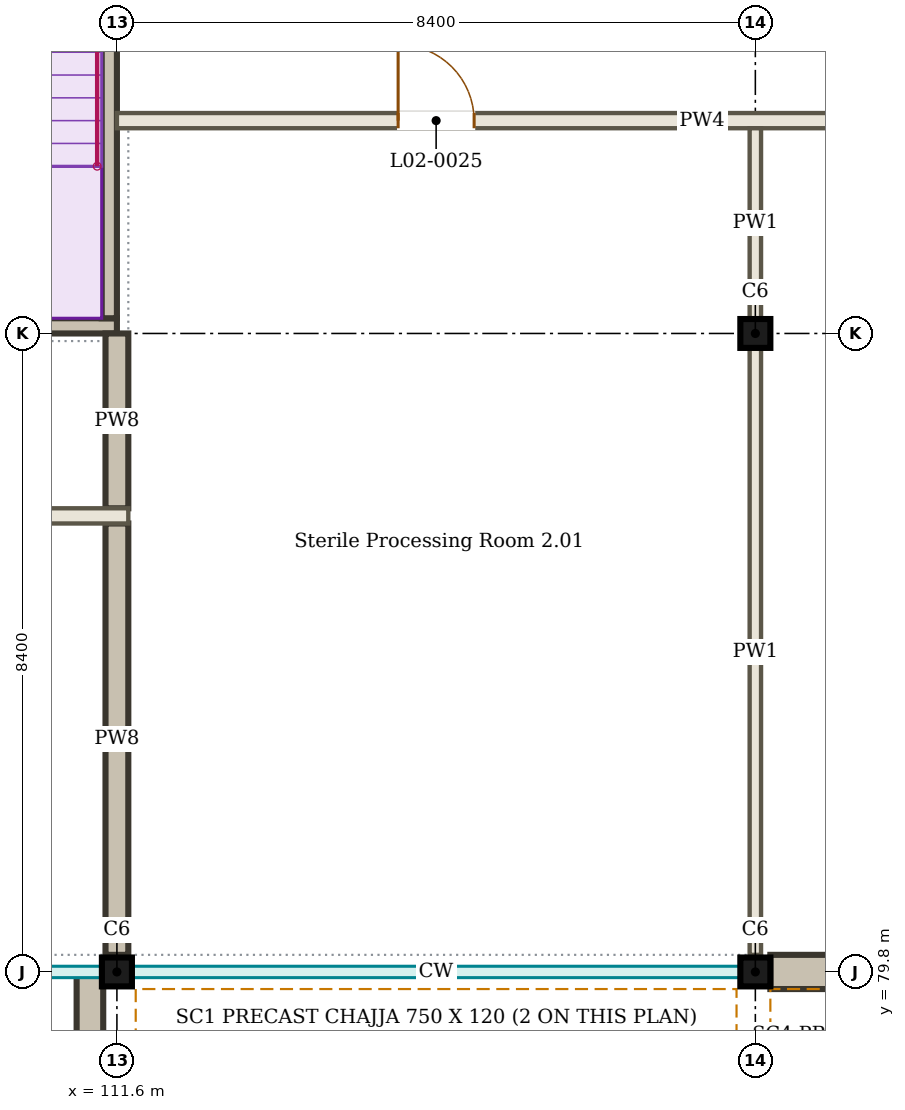
"""IFC4 building model, lengths in metres.
Left out: names, types, materials, properties, quantities, classifications, styles, units other than length and angle.
Written with IfcOpenShell. Run it as: python <this file> out.ifc"""

import sys

from ifc_helpers import new_model, si_unit, direction, frame, frame_2d, origin, origin_2d, place, context, subcontext, project, spatial, polyline, rectangle, i_section, outline, extrude, element, fill, save


model = new_model("IFC4")
c1 = context("Model", 3, precision=1e-05, world=origin(), true_north=direction((0.0, 1.0)))
c2 = subcontext(c1, "Body", "Model", "MODEL_VIEW")
j1 = project(units=[si_unit("LENGTHUNIT", "METRE"), si_unit("PLANEANGLEUNIT", "RADIAN")], contexts=[c1])
p1 = place(None, origin())
s1 = spatial("IfcSite", under=j1, at=p1, CompositionType="ELEMENT")
p2 = place(p1, origin())
s2 = spatial("IfcBuilding", under=s1, at=p2, CompositionType="ELEMENT")
p3 = place(p2, frame((0.0, 0.0, 9.0)))
s3 = spatial("IfcBuildingStorey", under=s2, at=p3, CompositionType="ELEMENT", Elevation=9.0)
for number, where, z_axis, x_axis in (
    (1, (111.6, 79.8, 0.0), (0.0, 0.0, 1.0), (1.0, 0.0, 0.0)),
    (2, (120.0, 79.8, 0.0), (0.0, 0.0, 1.0), (1.0, 0.0, 0.0)),
    (3, (120.0, 88.2, 0.0), (0.0, 0.0, 1.0), (1.0, 0.0, 0.0)),
):
    element("IfcColumn", number, at=place(p3, frame(where, z_axis=z_axis, x_axis=x_axis)), inside=s3, PredefinedType="COLUMN", context=c2, shape_type="SweptSolid", body=[
        extrude(i_section(OverallWidth=0.395, OverallDepth=0.38, WebThickness=0.019, FlangeThickness=0.03, FilletRadius=0.027, at=origin_2d()), origin(), (0.0, 0.0, 1.0), 4.5),
    ])
p4 = place(p3, frame((111.798, 79.64, 3.87), z_axis=(0.0, 0.0, 1.0), x_axis=(1.0, 0.0, 0.0)))
e4 = element("IfcWall", 4, at=p4, inside=s3, PredefinedType="SOLIDWALL", context=c2, shape_type="SweptSolid", body=[
    extrude(rectangle(XDim=8.005, YDim=0.13, at=frame_2d((4.002, 0.0))), origin(), (0.0, 0.0, 1.0), 0.63),
])
p5 = place(p3, frame((120.198, 79.8, 0.0), z_axis=(0.0, 0.0, 1.0), x_axis=(1.0, 0.0, 0.0)))
e5 = element("IfcWall", 5, at=p5, inside=s3, PredefinedType="SOLIDWALL", context=c2, shape_type="SweptSolid", body=[
    extrude(rectangle(XDim=8.005, YDim=0.45, at=frame_2d((4.002, 0.0))), origin(), (0.0, 0.0, 1.0), 3.85),
])
p6 = place(p5, frame((2.802, 0.0, 0.9)))
e6 = element("IfcOpeningElement", 6, at=p6, cuts=e5, PredefinedType="OPENING", context=c2, shape_type="SweptSolid", body=[
    extrude(rectangle(XDim=2.4, YDim=1.2, at=frame_2d((1.2, 0.6))), frame((0.0, 0.235, 0.0), z_axis=(0.0, -1.0, 0.0), x_axis=(1.0, 0.0, 0.0)), (0.0, 0.0, 1.0), 0.47),
])
p7 = place(p5, frame((6.502, 0.0, 2.1)))
e7 = element("IfcOpeningElement", 7, at=p7, cuts=e5, PredefinedType="OPENING", context=c2, shape_type="SweptSolid", body=[
    extrude(rectangle(XDim=0.6, YDim=1.2, at=frame_2d((0.3, 0.6))), frame((0.0, 0.235, 0.0), z_axis=(0.0, -1.0, 0.0), x_axis=(1.0, 0.0, 0.0)), (0.0, 0.0, 1.0), 0.47),
])
p8 = place(p3, frame((120.198, 79.64, 3.87), z_axis=(0.0, 0.0, 1.0), x_axis=(1.0, 0.0, 0.0)))
e8 = element("IfcWall", 8, at=p8, inside=s3, PredefinedType="SOLIDWALL", context=c2, shape_type="SweptSolid", body=[
    extrude(rectangle(XDim=8.005, YDim=0.13, at=frame_2d((4.002, 0.0))), origin(), (0.0, 0.0, 1.0), 0.63),
])
p9 = place(p3, frame((111.245, 54.6, 0.0), z_axis=(0.0, 0.0, 1.0), x_axis=(0.0, 1.0, 0.0)))
e9 = element("IfcWall", 9, at=p9, inside=s3, PredefinedType="SOLIDWALL", context=c2, shape_type="SweptSolid", body=[
    extrude(outline(polyline([(24.937, 0.0), (24.937, 0.0), (23.909, 1.952), (22.881, 3.356), (21.853, 4.453), (20.825, 5.339), (19.797, 6.063), (18.769, 6.655), (17.74, 7.133), (16.712, 7.511), (15.684, 7.798), (14.656, 7.999), (13.628, 8.118), (12.6, 8.158), (11.572, 8.118), (10.544, 7.999), (9.516, 7.798), (8.488, 7.511), (7.459, 7.133), (6.431, 6.655), (5.403, 6.063), (4.375, 5.339), (3.347, 4.453), (2.319, 3.356), (1.291, 1.952), (0.263, 0.0), (0.263, 0.0), (24.937, 0.0)])), frame((0.0, 0.175, 0.0), z_axis=(0.0, -1.0, 0.0), x_axis=(1.0, 0.0, 0.0)), (0.0, 0.0, 1.0), 0.35),
])
p10 = place(p3, frame((44.25, 85.8, 0.0), z_axis=(0.0, 0.0, 1.0), x_axis=(1.0, 0.0, 0.0)))
e10 = element("IfcWall", 10, at=p10, inside=s3, PredefinedType="PARTITIONING", context=c2, shape_type="SweptSolid", body=[
    extrude(rectangle(XDim=67.5, YDim=0.2, at=frame_2d((33.75, 0.0))), origin(), (0.0, 0.0, 1.0), 3.9),
])
p11 = place(p10, frame((7.65, 0.0, 0.0)))
e11 = element("IfcOpeningElement", 11, at=p11, cuts=e10, PredefinedType="OPENING", context=c2, shape_type="SweptSolid", body=[
    extrude(rectangle(XDim=1.8, YDim=2.1, at=frame_2d((0.9, 1.05))), frame((0.0, 0.11, 0.0), z_axis=(0.0, -1.0, 0.0), x_axis=(1.0, 0.0, 0.0)), (0.0, 0.0, 1.0), 0.22),
])
p12 = place(p10, frame((19.25, 0.0, 0.0)))
e12 = element("IfcOpeningElement", 12, at=p12, cuts=e10, PredefinedType="OPENING", context=c2, shape_type="SweptSolid", body=[
    extrude(rectangle(XDim=1.0, YDim=2.1, at=frame_2d((0.5, 1.05))), frame((0.0, 0.11, 0.0), z_axis=(0.0, -1.0, 0.0), x_axis=(1.0, 0.0, 0.0)), (0.0, 0.0, 1.0), 0.22),
])
p13 = place(p10, frame((24.85, 0.0, 0.0)))
e13 = element("IfcOpeningElement", 13, at=p13, cuts=e10, PredefinedType="OPENING", context=c2, shape_type="SweptSolid", body=[
    extrude(rectangle(XDim=1.0, YDim=2.1, at=frame_2d((0.5, 1.05))), frame((0.0, 0.11, 0.0), z_axis=(0.0, -1.0, 0.0), x_axis=(1.0, 0.0, 0.0)), (0.0, 0.0, 1.0), 0.22),
])
p14 = place(p10, frame((31.85, 0.0, 0.0)))
e14 = element("IfcOpeningElement", 14, at=p14, cuts=e10, PredefinedType="OPENING", context=c2, shape_type="SweptSolid", body=[
    extrude(rectangle(XDim=1.0, YDim=2.1, at=frame_2d((0.5, 1.05))), frame((0.0, 0.11, 0.0), z_axis=(0.0, -1.0, 0.0), x_axis=(1.0, 0.0, 0.0)), (0.0, 0.0, 1.0), 0.22),
])
p15 = place(p10, frame((44.05, 0.0, 0.0)))
e15 = element("IfcOpeningElement", 15, at=p15, cuts=e10, PredefinedType="OPENING", context=c2, shape_type="SweptSolid", body=[
    extrude(rectangle(XDim=1.8, YDim=2.1, at=frame_2d((0.9, 1.05))), frame((0.0, 0.11, 0.0), z_axis=(0.0, -1.0, 0.0), x_axis=(1.0, 0.0, 0.0)), (0.0, 0.0, 1.0), 0.22),
])
p16 = place(p10, frame((55.65, 0.0, 0.0)))
e16 = element("IfcOpeningElement", 16, at=p16, cuts=e10, PredefinedType="OPENING", context=c2, shape_type="SweptSolid", body=[
    extrude(rectangle(XDim=1.0, YDim=2.1, at=frame_2d((0.5, 1.05))), frame((0.0, 0.11, 0.0), z_axis=(0.0, -1.0, 0.0), x_axis=(1.0, 0.0, 0.0)), (0.0, 0.0, 1.0), 0.22),
])
p17 = place(p10, frame((62.65, 0.0, 0.0)))
e17 = element("IfcOpeningElement", 17, at=p17, cuts=e10, PredefinedType="OPENING", context=c2, shape_type="SweptSolid", body=[
    extrude(rectangle(XDim=1.0, YDim=2.1, at=frame_2d((0.5, 1.05))), frame((0.0, 0.11, 0.0), z_axis=(0.0, -1.0, 0.0), x_axis=(1.0, 0.0, 0.0)), (0.0, 0.0, 1.0), 0.22),
])
p18 = place(p3, frame((111.6, 91.0, 0.0), z_axis=(0.0, 0.0, 1.0), x_axis=(1.0, 0.0, 0.0)))
e18 = element("IfcWall", 18, at=p18, inside=s3, PredefinedType="PARTITIONING", context=c2, shape_type="SweptSolid", body=[
    extrude(rectangle(XDim=22.5, YDim=0.2, at=frame_2d((11.25, 0.0))), origin(), (0.0, 0.0, 1.0), 3.8),
])
p19 = place(p18, frame((3.7, 0.0, 0.0)))
e19 = element("IfcOpeningElement", 19, at=p19, cuts=e18, PredefinedType="OPENING", context=c2, shape_type="SweptSolid", body=[
    extrude(rectangle(XDim=1.0, YDim=2.1, at=frame_2d((0.5, 1.05))), frame((0.0, 0.11, 0.0), z_axis=(0.0, -1.0, 0.0), x_axis=(1.0, 0.0, 0.0)), (0.0, 0.0, 1.0), 0.22),
])
p20 = place(p18, frame((10.7, 0.0, 0.0)))
e20 = element("IfcOpeningElement", 20, at=p20, cuts=e18, PredefinedType="OPENING", context=c2, shape_type="SweptSolid", body=[
    extrude(rectangle(XDim=1.0, YDim=2.1, at=frame_2d((0.5, 1.05))), frame((0.0, 0.11, 0.0), z_axis=(0.0, -1.0, 0.0), x_axis=(1.0, 0.0, 0.0)), (0.0, 0.0, 1.0), 0.22),
])
p21 = place(p18, frame((15.9, 0.0, 0.0)))
e21 = element("IfcOpeningElement", 21, at=p21, cuts=e18, PredefinedType="OPENING", context=c2, shape_type="SweptSolid", body=[
    extrude(rectangle(XDim=1.8, YDim=2.1, at=frame_2d((0.9, 1.05))), frame((0.0, 0.11, 0.0), z_axis=(0.0, -1.0, 0.0), x_axis=(1.0, 0.0, 0.0)), (0.0, 0.0, 1.0), 0.22),
])
p22 = place(p3, frame((111.6, 80.025, 0.0), z_axis=(0.0, 0.0, 1.0), x_axis=(0.0, 1.0, 0.0)))
e22 = element("IfcWall", 22, at=p22, inside=s3, PredefinedType="SOLIDWALL", context=c2, shape_type="SweptSolid", body=[
    extrude(rectangle(XDim=5.675, YDim=0.3, at=frame_2d((2.837, 0.0))), origin(), (0.0, 0.0, 1.0), 3.936),
])
p23 = place(p3, frame((111.6, 85.9, 0.0), z_axis=(0.0, 0.0, 1.0), x_axis=(0.0, 1.0, 0.0)))
e23 = element("IfcWall", 23, at=p23, inside=s3, PredefinedType="SOLIDWALL", context=c2, shape_type="SweptSolid", body=[
    extrude(rectangle(XDim=2.3, YDim=0.3, at=frame_2d((1.15, 0.0))), origin(), (0.0, 0.0, 1.0), 3.8),
])
p24 = place(p3, frame((120.0, 80.025, 0.0), z_axis=(0.0, 0.0, 1.0), x_axis=(0.0, 1.0, 0.0)))
e24 = element("IfcWall", 24, at=p24, inside=s3, PredefinedType="PARTITIONING", context=c2, shape_type="SweptSolid", body=[
    extrude(rectangle(XDim=7.978, YDim=0.15, at=frame_2d((3.989, 0.0))), origin(), (0.0, 0.0, 1.0), 3.8),
])
p25 = place(p3, frame((120.0, 88.397, 0.0), z_axis=(0.0, 0.0, 1.0), x_axis=(0.0, 1.0, 0.0)))
e25 = element("IfcWall", 25, at=p25, inside=s3, PredefinedType="PARTITIONING", context=c2, shape_type="SweptSolid", body=[
    extrude(rectangle(XDim=2.502, YDim=0.15, at=frame_2d((1.251, 0.0))), origin(), (0.0, 0.0, 1.0), 3.8),
])
p26 = place(p3, frame((111.6, 88.3, 0.0), z_axis=(0.0, 0.0, 1.0), x_axis=(-1.0, 0.0, 0.0)))
e26 = element("IfcWall", 26, at=p26, inside=s3, PredefinedType="SOLIDWALL", context=c2, shape_type="SweptSolid", body=[
    extrude(rectangle(XDim=8.4, YDim=0.2, at=frame_2d((4.2, 0.0))), origin(), (0.0, 0.0, 1.0), 4.5),
])
p27 = place(p26, frame((4.725, 0.0, 0.0)))
e27 = element("IfcOpeningElement", 27, at=p27, cuts=e26, PredefinedType="OPENING", context=c2, shape_type="SweptSolid", body=[
    extrude(rectangle(XDim=1.3, YDim=2.1, at=frame_2d((0.65, 1.05))), frame((0.0, 0.11, 0.0), z_axis=(0.0, -1.0, 0.0), x_axis=(1.0, 0.0, 0.0)), (0.0, 0.0, 1.0), 0.22),
])
p28 = place(p3, frame((111.5, 88.4, 0.0), z_axis=(0.0, 0.0, 1.0), x_axis=(0.0, 1.0, 0.0)))
e28 = element("IfcWall", 28, at=p28, inside=s3, PredefinedType="SOLIDWALL", context=c2, shape_type="SweptSolid", body=[
    extrude(rectangle(XDim=7.975, YDim=0.2, at=frame_2d((3.988, 0.0))), origin(), (0.0, 0.0, 1.0), 4.5),
])
p29 = place(p19, origin())
e29 = element("IfcDoor", 29, at=p29, inside=s3, OperationType="SINGLE_SWING_LEFT", PredefinedType="DOOR", context=c2, shape_type="SweptSolid", body=[
    extrude(rectangle(XDim=1.0, YDim=2.1, at=frame_2d((0.5, 1.05))), frame((0.0, 0.025, 0.0), z_axis=(0.0, -1.0, 0.0), x_axis=(1.0, 0.0, 0.0)), (0.0, 0.0, 1.0), 0.05),
])
fill(e19, e29)
save(model, sys.argv[1])
